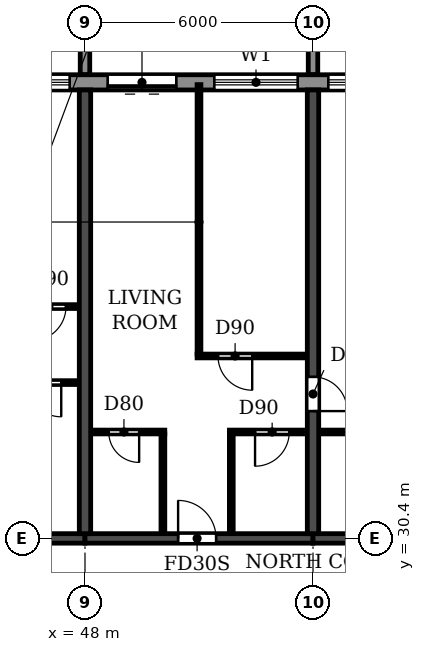
"""IFC4 building model, lengths in metres.
Left out: names, types, materials, properties, quantities, classifications, styles, units other than length and angle.
Written with IfcOpenShell. Run it as: python <this file> out.ifc"""

import sys

from ifc_helpers import new_model, si_unit, direction, frame, frame_2d, origin, place, context, subcontext, project, spatial, polyline, rectangle, outline, extrude, source, transform, mapped, element, fill, save


model = new_model("IFC4")
c1 = context("Model", 3, precision=1e-05, world=origin(), true_north=direction((0.0, 1.0)))
c2 = subcontext(c1, "Body", "Model", "MODEL_VIEW")
j1 = project(units=[si_unit("LENGTHUNIT", "METRE"), si_unit("PLANEANGLEUNIT", "RADIAN")], contexts=[c1])
p1 = place(None, origin())
s1 = spatial("IfcSite", under=j1, at=p1, CompositionType="ELEMENT")
p2 = place(p1, origin())
s2 = spatial("IfcBuilding", under=s1, at=p2, CompositionType="ELEMENT")
p3 = place(p2, frame((0.0, 0.0, 152.1)))
s3 = spatial("IfcBuildingStorey", under=s2, at=p3, CompositionType="ELEMENT", Elevation=152.1)
p4 = place(p3, frame((48.0, 30.525, 0.0), z_axis=(0.0, 0.0, 1.0), x_axis=(0.0, 1.0, 0.0)))
e1 = element("IfcWall", 1, at=p4, inside=s3, PredefinedType="SHEAR", context=c2, shape_type="SweptSolid", body=[
    extrude(rectangle(XDim=11.675, YDim=0.3, at=frame_2d((5.837, 0.0))), origin(), (0.0, 0.0, 1.0), 3.07),
])
p5 = place(p3, frame((54.0, 30.525, 0.0), z_axis=(0.0, 0.0, 1.0), x_axis=(0.0, 1.0, 0.0)))
e2 = element("IfcWall", 2, at=p5, inside=s3, PredefinedType="SHEAR", context=c2, shape_type="SweptSolid", body=[
    extrude(rectangle(XDim=11.675, YDim=0.3, at=frame_2d((5.837, 0.0))), origin(), (0.0, 0.0, 1.0), 3.07),
])
p6 = place(p5, frame((3.225, 0.0, 0.0)))
e3 = element("IfcOpeningElement", 3, at=p6, cuts=e2, PredefinedType="OPENING", context=c2, shape_type="SweptSolid", body=[
    extrude(rectangle(XDim=0.9, YDim=2.1, at=frame_2d((0.45, 1.05))), frame((0.0, 0.16, 0.0), z_axis=(0.0, -1.0, 0.0), x_axis=(1.0, 0.0, 0.0)), (0.0, 0.0, 1.0), 0.32),
])
p7 = place(p3, frame((42.0, 30.4, 0.0), z_axis=(0.0, 0.0, 1.0), x_axis=(1.0, 0.0, 0.0)))
e4 = element("IfcWall", 4, at=p7, inside=s3, PredefinedType="SHEAR", context=c2, shape_type="SweptSolid", body=[
    extrude(rectangle(XDim=6.0, YDim=0.25, at=frame_2d((3.0, 0.0))), origin(), (0.0, 0.0, 1.0), 2.47),
])
p8 = place(p7, frame((2.45, 0.0, 0.0)))
e5 = element("IfcOpeningElement", 5, at=p8, cuts=e4, PredefinedType="OPENING", context=c2, shape_type="SweptSolid", body=[
    extrude(rectangle(XDim=1.0, YDim=2.1, at=frame_2d((0.5, 1.05))), frame((0.0, 0.135, 0.0), z_axis=(0.0, -1.0, 0.0), x_axis=(1.0, 0.0, 0.0)), (0.0, 0.0, 1.0), 0.27),
])
p9 = place(p3, frame((48.0, 30.4, 0.0), z_axis=(0.0, 0.0, 1.0), x_axis=(1.0, 0.0, 0.0)))
e6 = element("IfcWall", 6, at=p9, inside=s3, PredefinedType="SHEAR", context=c2, shape_type="SweptSolid", body=[
    extrude(rectangle(XDim=6.0, YDim=0.25, at=frame_2d((3.0, 0.0))), origin(), (0.0, 0.0, 1.0), 2.47),
])
p10 = place(p9, frame((2.45, 0.0, 0.0)))
e7 = element("IfcOpeningElement", 7, at=p10, cuts=e6, PredefinedType="OPENING", context=c2, shape_type="SweptSolid", body=[
    extrude(rectangle(XDim=1.0, YDim=2.1, at=frame_2d((0.5, 1.05))), frame((0.0, 0.135, 0.0), z_axis=(0.0, -1.0, 0.0), x_axis=(1.0, 0.0, 0.0)), (0.0, 0.0, 1.0), 0.27),
])
p11 = place(p3, frame((54.0, 30.4, 0.0), z_axis=(0.0, 0.0, 1.0), x_axis=(1.0, 0.0, 0.0)))
e8 = element("IfcWall", 8, at=p11, inside=s3, PredefinedType="SHEAR", context=c2, shape_type="SweptSolid", body=[
    extrude(rectangle(XDim=6.0, YDim=0.25, at=frame_2d((3.0, 0.0))), origin(), (0.0, 0.0, 1.0), 2.47),
])
p12 = place(p3, frame((85.317, 42.4, 0.0), z_axis=(0.0, 0.0, 1.0), x_axis=(-1.0, 0.0, 0.0)))
e9 = element("IfcWall", 9, at=p12, inside=s3, PredefinedType="STANDARD", context=c2, shape_type="SweptSolid", body=[
    extrude(rectangle(XDim=68.634, YDim=0.4, at=frame_2d((34.317, 0.0))), origin(), (0.0, 0.0, 1.0), 3.07),
])
p13 = place(p12, frame((64.917, 0.0, 0.0)))
e10 = element("IfcOpeningElement", 10, at=p13, cuts=e9, PredefinedType="OPENING", context=c2, shape_type="SweptSolid", body=[
    extrude(rectangle(XDim=1.8, YDim=2.4, at=frame_2d((0.9, 1.2))), frame((0.0, 0.21, 0.0), z_axis=(0.0, -1.0, 0.0), x_axis=(1.0, 0.0, 0.0)), (0.0, 0.0, 1.0), 0.42),
])
p14 = place(p12, frame((61.717, 0.0, 0.9)))
e11 = element("IfcOpeningElement", 11, at=p14, cuts=e9, PredefinedType="OPENING", context=c2, shape_type="SweptSolid", body=[
    extrude(rectangle(XDim=2.2, YDim=1.5, at=frame_2d((1.1, 0.75))), frame((0.0, 0.21, 0.0), z_axis=(0.0, -1.0, 0.0), x_axis=(1.0, 0.0, 0.0)), (0.0, 0.0, 1.0), 0.42),
])
p15 = place(p12, frame((58.717, 0.0, 0.9)))
e12 = element("IfcOpeningElement", 12, at=p15, cuts=e9, PredefinedType="OPENING", context=c2, shape_type="SweptSolid", body=[
    extrude(rectangle(XDim=2.2, YDim=1.5, at=frame_2d((1.1, 0.75))), frame((0.0, 0.21, 0.0), z_axis=(0.0, -1.0, 0.0), x_axis=(1.0, 0.0, 0.0)), (0.0, 0.0, 1.0), 0.42),
])
p16 = place(p12, frame((55.917, 0.0, 0.0)))
e13 = element("IfcOpeningElement", 13, at=p16, cuts=e9, PredefinedType="OPENING", context=c2, shape_type="SweptSolid", body=[
    extrude(rectangle(XDim=1.8, YDim=2.4, at=frame_2d((0.9, 1.2))), frame((0.0, 0.21, 0.0), z_axis=(0.0, -1.0, 0.0), x_axis=(1.0, 0.0, 0.0)), (0.0, 0.0, 1.0), 0.42),
])
p17 = place(p12, frame((52.917, 0.0, 0.0)))
e14 = element("IfcOpeningElement", 14, at=p17, cuts=e9, PredefinedType="OPENING", context=c2, shape_type="SweptSolid", body=[
    extrude(rectangle(XDim=1.8, YDim=2.4, at=frame_2d((0.9, 1.2))), frame((0.0, 0.21, 0.0), z_axis=(0.0, -1.0, 0.0), x_axis=(1.0, 0.0, 0.0)), (0.0, 0.0, 1.0), 0.42),
])
p18 = place(p12, frame((49.717, 0.0, 0.9)))
e15 = element("IfcOpeningElement", 15, at=p18, cuts=e9, PredefinedType="OPENING", context=c2, shape_type="SweptSolid", body=[
    extrude(rectangle(XDim=2.2, YDim=1.5, at=frame_2d((1.1, 0.75))), frame((0.0, 0.21, 0.0), z_axis=(0.0, -1.0, 0.0), x_axis=(1.0, 0.0, 0.0)), (0.0, 0.0, 1.0), 0.42),
])
p19 = place(p12, frame((46.717, 0.0, 0.9)))
e16 = element("IfcOpeningElement", 16, at=p19, cuts=e9, PredefinedType="OPENING", context=c2, shape_type="SweptSolid", body=[
    extrude(rectangle(XDim=2.2, YDim=1.5, at=frame_2d((1.1, 0.75))), frame((0.0, 0.21, 0.0), z_axis=(0.0, -1.0, 0.0), x_axis=(1.0, 0.0, 0.0)), (0.0, 0.0, 1.0), 0.42),
])
p20 = place(p12, frame((43.717, 0.0, 0.9)))
e17 = element("IfcOpeningElement", 17, at=p20, cuts=e9, PredefinedType="OPENING", context=c2, shape_type="SweptSolid", body=[
    extrude(rectangle(XDim=2.2, YDim=1.5, at=frame_2d((1.1, 0.75))), frame((0.0, 0.21, 0.0), z_axis=(0.0, -1.0, 0.0), x_axis=(1.0, 0.0, 0.0)), (0.0, 0.0, 1.0), 0.42),
])
p21 = place(p12, frame((40.917, 0.0, 0.0)))
e18 = element("IfcOpeningElement", 18, at=p21, cuts=e9, PredefinedType="OPENING", context=c2, shape_type="SweptSolid", body=[
    extrude(rectangle(XDim=1.8, YDim=2.4, at=frame_2d((0.9, 1.2))), frame((0.0, 0.21, 0.0), z_axis=(0.0, -1.0, 0.0), x_axis=(1.0, 0.0, 0.0)), (0.0, 0.0, 1.0), 0.42),
])
p22 = place(p12, frame((37.717, 0.0, 0.9)))
e19 = element("IfcOpeningElement", 19, at=p22, cuts=e9, PredefinedType="OPENING", context=c2, shape_type="SweptSolid", body=[
    extrude(rectangle(XDim=2.2, YDim=1.5, at=frame_2d((1.1, 0.75))), frame((0.0, 0.21, 0.0), z_axis=(0.0, -1.0, 0.0), x_axis=(1.0, 0.0, 0.0)), (0.0, 0.0, 1.0), 0.42),
])
p23 = place(p12, frame((34.917, 0.0, 0.0)))
e20 = element("IfcOpeningElement", 20, at=p23, cuts=e9, PredefinedType="OPENING", context=c2, shape_type="SweptSolid", body=[
    extrude(rectangle(XDim=1.8, YDim=2.4, at=frame_2d((0.9, 1.2))), frame((0.0, 0.21, 0.0), z_axis=(0.0, -1.0, 0.0), x_axis=(1.0, 0.0, 0.0)), (0.0, 0.0, 1.0), 0.42),
])
p24 = place(p12, frame((31.717, 0.0, 0.9)))
e21 = element("IfcOpeningElement", 21, at=p24, cuts=e9, PredefinedType="OPENING", context=c2, shape_type="SweptSolid", body=[
    extrude(rectangle(XDim=2.2, YDim=1.5, at=frame_2d((1.1, 0.75))), frame((0.0, 0.21, 0.0), z_axis=(0.0, -1.0, 0.0), x_axis=(1.0, 0.0, 0.0)), (0.0, 0.0, 1.0), 0.42),
])
p25 = place(p12, frame((28.717, 0.0, 0.9)))
e22 = element("IfcOpeningElement", 22, at=p25, cuts=e9, PredefinedType="OPENING", context=c2, shape_type="SweptSolid", body=[
    extrude(rectangle(XDim=2.2, YDim=1.5, at=frame_2d((1.1, 0.75))), frame((0.0, 0.21, 0.0), z_axis=(0.0, -1.0, 0.0), x_axis=(1.0, 0.0, 0.0)), (0.0, 0.0, 1.0), 0.42),
])
p26 = place(p12, frame((25.717, 0.0, 0.9)))
e23 = element("IfcOpeningElement", 23, at=p26, cuts=e9, PredefinedType="OPENING", context=c2, shape_type="SweptSolid", body=[
    extrude(rectangle(XDim=2.2, YDim=1.5, at=frame_2d((1.1, 0.75))), frame((0.0, 0.21, 0.0), z_axis=(0.0, -1.0, 0.0), x_axis=(1.0, 0.0, 0.0)), (0.0, 0.0, 1.0), 0.42),
])
p27 = place(p12, frame((22.717, 0.0, 0.9)))
e24 = element("IfcOpeningElement", 24, at=p27, cuts=e9, PredefinedType="OPENING", context=c2, shape_type="SweptSolid", body=[
    extrude(rectangle(XDim=2.2, YDim=1.5, at=frame_2d((1.1, 0.75))), frame((0.0, 0.21, 0.0), z_axis=(0.0, -1.0, 0.0), x_axis=(1.0, 0.0, 0.0)), (0.0, 0.0, 1.0), 0.42),
])
p28 = place(p12, frame((19.917, 0.0, 0.0)))
e25 = element("IfcOpeningElement", 25, at=p28, cuts=e9, PredefinedType="OPENING", context=c2, shape_type="SweptSolid", body=[
    extrude(rectangle(XDim=1.8, YDim=2.4, at=frame_2d((0.9, 1.2))), frame((0.0, 0.21, 0.0), z_axis=(0.0, -1.0, 0.0), x_axis=(1.0, 0.0, 0.0)), (0.0, 0.0, 1.0), 0.42),
])
p29 = place(p12, frame((16.717, 0.0, 0.9)))
e26 = element("IfcOpeningElement", 26, at=p29, cuts=e9, PredefinedType="OPENING", context=c2, shape_type="SweptSolid", body=[
    extrude(rectangle(XDim=2.2, YDim=1.5, at=frame_2d((1.1, 0.75))), frame((0.0, 0.21, 0.0), z_axis=(0.0, -1.0, 0.0), x_axis=(1.0, 0.0, 0.0)), (0.0, 0.0, 1.0), 0.42),
])
p30 = place(p12, frame((13.717, 0.0, 0.9)))
e27 = element("IfcOpeningElement", 27, at=p30, cuts=e9, PredefinedType="OPENING", context=c2, shape_type="SweptSolid", body=[
    extrude(rectangle(XDim=2.2, YDim=1.5, at=frame_2d((1.1, 0.75))), frame((0.0, 0.21, 0.0), z_axis=(0.0, -1.0, 0.0), x_axis=(1.0, 0.0, 0.0)), (0.0, 0.0, 1.0), 0.42),
])
p31 = place(p12, frame((10.917, 0.0, 0.0)))
e28 = element("IfcOpeningElement", 28, at=p31, cuts=e9, PredefinedType="OPENING", context=c2, shape_type="SweptSolid", body=[
    extrude(rectangle(XDim=1.8, YDim=2.4, at=frame_2d((0.9, 1.2))), frame((0.0, 0.21, 0.0), z_axis=(0.0, -1.0, 0.0), x_axis=(1.0, 0.0, 0.0)), (0.0, 0.0, 1.0), 0.42),
])
p32 = place(p12, frame((7.717, 0.0, 0.9)))
e29 = element("IfcOpeningElement", 29, at=p32, cuts=e9, PredefinedType="OPENING", context=c2, shape_type="SweptSolid", body=[
    extrude(rectangle(XDim=2.2, YDim=1.5, at=frame_2d((1.1, 0.75))), frame((0.0, 0.21, 0.0), z_axis=(0.0, -1.0, 0.0), x_axis=(1.0, 0.0, 0.0)), (0.0, 0.0, 1.0), 0.42),
])
p33 = place(p12, frame((4.717, 0.0, 0.9)))
e30 = element("IfcOpeningElement", 30, at=p33, cuts=e9, PredefinedType="OPENING", context=c2, shape_type="SweptSolid", body=[
    extrude(rectangle(XDim=2.2, YDim=1.5, at=frame_2d((1.1, 0.75))), frame((0.0, 0.21, 0.0), z_axis=(0.0, -1.0, 0.0), x_axis=(1.0, 0.0, 0.0)), (0.0, 0.0, 1.0), 0.42),
])
p34 = place(p12, frame((1.917, 0.0, 0.0)))
e31 = element("IfcOpeningElement", 31, at=p34, cuts=e9, PredefinedType="OPENING", context=c2, shape_type="SweptSolid", body=[
    extrude(rectangle(XDim=1.8, YDim=2.4, at=frame_2d((0.9, 1.2))), frame((0.0, 0.21, 0.0), z_axis=(0.0, -1.0, 0.0), x_axis=(1.0, 0.0, 0.0)), (0.0, 0.0, 1.0), 0.42),
])
m1 = source(origin(), c2, "Body", "SweptSolid", [
    extrude(outline(polyline([(0.0, 0.0), (0.25, 0.0), (0.25, 3.1), (0.0, 3.1), (0.0, 0.0)])), origin(), (0.0, 0.0, 1.0), 3.1),
])
for number, where in (
    (32, (47.875, 42.6, 0.0)),
    (33, (53.875, 42.6, 0.0)),
):
    element("IfcWall", number, at=place(p3, frame(where)), inside=s3, PredefinedType="STANDARD", context=c2, shape_type="MappedRepresentation", body=[
        mapped(m1, transform((0.0, 0.0, 0.0))),
    ])
p35 = place(p3, frame((48.16, 33.2, 0.0), z_axis=(0.0, 0.0, 1.0), x_axis=(1.0, 0.0, 0.0)))
e34 = element("IfcWall", 34, at=p35, inside=s3, PredefinedType="PARTITIONING", context=c2, shape_type="SweptSolid", body=[
    extrude(rectangle(XDim=1.94, YDim=0.1, at=frame_2d((0.97, 0.0))), origin(), (0.0, 0.0, 1.0), 3.07),
])
p36 = place(p35, frame((0.465, 0.0, 0.0)))
e35 = element("IfcOpeningElement", 35, at=p36, cuts=e34, PredefinedType="OPENING", context=c2, shape_type="SweptSolid", body=[
    extrude(rectangle(XDim=0.8, YDim=2.1, at=frame_2d((0.4, 1.05))), frame((0.0, 0.06, 0.0), z_axis=(0.0, -1.0, 0.0), x_axis=(1.0, 0.0, 0.0)), (0.0, 0.0, 1.0), 0.12),
])
p37 = place(p3, frame((51.8, 33.2, 0.0), z_axis=(0.0, 0.0, 1.0), x_axis=(1.0, 0.0, 0.0)))
e36 = element("IfcWall", 36, at=p37, inside=s3, PredefinedType="PARTITIONING", context=c2, shape_type="SweptSolid", body=[
    extrude(rectangle(XDim=2.04, YDim=0.1, at=frame_2d((1.02, 0.0))), origin(), (0.0, 0.0, 1.0), 3.07),
])
p38 = place(p37, frame((0.675, 0.0, 0.0)))
e37 = element("IfcOpeningElement", 37, at=p38, cuts=e36, PredefinedType="OPENING", context=c2, shape_type="SweptSolid", body=[
    extrude(rectangle(XDim=0.9, YDim=2.1, at=frame_2d((0.45, 1.05))), frame((0.0, 0.06, 0.0), z_axis=(0.0, -1.0, 0.0), x_axis=(1.0, 0.0, 0.0)), (0.0, 0.0, 1.0), 0.12),
])
p39 = place(p3, frame((54.16, 33.2, 0.0), z_axis=(0.0, 0.0, 1.0), x_axis=(1.0, 0.0, 0.0)))
e38 = element("IfcWall", 38, at=p39, inside=s3, PredefinedType="PARTITIONING", context=c2, shape_type="SweptSolid", body=[
    extrude(rectangle(XDim=2.74, YDim=0.1, at=frame_2d((1.37, 0.0))), origin(), (0.0, 0.0, 1.0), 3.07),
])
p40 = place(p39, frame((0.94, 0.0, 0.0)))
e39 = element("IfcOpeningElement", 39, at=p40, cuts=e38, PredefinedType="OPENING", context=c2, shape_type="SweptSolid", body=[
    extrude(rectangle(XDim=0.8, YDim=2.1, at=frame_2d((0.4, 1.05))), frame((0.0, 0.06, 0.0), z_axis=(0.0, -1.0, 0.0), x_axis=(1.0, 0.0, 0.0)), (0.0, 0.0, 1.0), 0.12),
])
p41 = place(p3, frame((45.8, 34.5, 0.0), z_axis=(0.0, 0.0, 1.0), x_axis=(1.0, 0.0, 0.0)))
e40 = element("IfcWall", 40, at=p41, inside=s3, PredefinedType="PARTITIONING", context=c2, shape_type="SweptSolid", body=[
    extrude(rectangle(XDim=2.04, YDim=0.1, at=frame_2d((1.02, 0.0))), origin(), (0.0, 0.0, 1.0), 3.07),
])
p42 = place(p41, frame((0.675, 0.0, 0.0)))
e41 = element("IfcOpeningElement", 41, at=p42, cuts=e40, PredefinedType="OPENING", context=c2, shape_type="SweptSolid", body=[
    extrude(rectangle(XDim=0.9, YDim=2.1, at=frame_2d((0.45, 1.05))), frame((0.0, 0.06, 0.0), z_axis=(0.0, -1.0, 0.0), x_axis=(1.0, 0.0, 0.0)), (0.0, 0.0, 1.0), 0.12),
])
p43 = place(p3, frame((50.95, 35.2, 0.0), z_axis=(0.0, 0.0, 1.0), x_axis=(1.0, 0.0, 0.0)))
e42 = element("IfcWall", 42, at=p43, inside=s3, PredefinedType="PARTITIONING", context=c2, shape_type="SweptSolid", body=[
    extrude(rectangle(XDim=2.89, YDim=0.1, at=frame_2d((1.445, 0.0))), origin(), (0.0, 0.0, 1.0), 3.07),
])
p44 = place(p43, frame((0.55, 0.0, 0.0)))
e43 = element("IfcOpeningElement", 43, at=p44, cuts=e42, PredefinedType="OPENING", context=c2, shape_type="SweptSolid", body=[
    extrude(rectangle(XDim=0.9, YDim=2.1, at=frame_2d((0.45, 1.05))), frame((0.0, 0.06, 0.0), z_axis=(0.0, -1.0, 0.0), x_axis=(1.0, 0.0, 0.0)), (0.0, 0.0, 1.0), 0.12),
])
p45 = place(p3, frame((44.95, 36.5, 0.0), z_axis=(0.0, 0.0, 1.0), x_axis=(1.0, 0.0, 0.0)))
e44 = element("IfcWall", 44, at=p45, inside=s3, PredefinedType="PARTITIONING", context=c2, shape_type="SweptSolid", body=[
    extrude(rectangle(XDim=2.89, YDim=0.1, at=frame_2d((1.445, 0.0))), origin(), (0.0, 0.0, 1.0), 3.07),
])
p46 = place(p45, frame((1.65, 0.0, 0.0)))
e45 = element("IfcOpeningElement", 45, at=p46, cuts=e44, PredefinedType="OPENING", context=c2, shape_type="SweptSolid", body=[
    extrude(rectangle(XDim=0.9, YDim=2.1, at=frame_2d((0.45, 1.05))), frame((0.0, 0.06, 0.0), z_axis=(0.0, -1.0, 0.0), x_axis=(1.0, 0.0, 0.0)), (0.0, 0.0, 1.0), 0.12),
])
p47 = place(p3, frame((50.05, 30.535, 0.0), z_axis=(0.0, 0.0, 1.0), x_axis=(0.0, 1.0, 0.0)))
e46 = element("IfcWall", 46, at=p47, inside=s3, PredefinedType="PARTITIONING", context=c2, shape_type="SweptSolid", body=[
    extrude(rectangle(XDim=2.615, YDim=0.1, at=frame_2d((1.308, 0.0))), origin(), (0.0, 0.0, 1.0), 3.07),
])
p48 = place(p3, frame((51.0, 35.25, 0.0), z_axis=(0.0, 0.0, 1.0), x_axis=(0.0, 1.0, 0.0)))
e47 = element("IfcWall", 47, at=p48, inside=s3, PredefinedType="PARTITIONING", context=c2, shape_type="SweptSolid", body=[
    extrude(rectangle(XDim=7.09, YDim=0.1, at=frame_2d((3.545, 0.0))), origin(), (0.0, 0.0, 1.0), 3.07),
])
p49 = place(p3, frame((51.85, 30.535, 0.0), z_axis=(0.0, 0.0, 1.0), x_axis=(0.0, 1.0, 0.0)))
e48 = element("IfcWall", 48, at=p49, inside=s3, PredefinedType="PARTITIONING", context=c2, shape_type="SweptSolid", body=[
    extrude(rectangle(XDim=2.615, YDim=0.1, at=frame_2d((1.308, 0.0))), origin(), (0.0, 0.0, 1.0), 3.07),
])
p50 = place(p22, origin())
e49 = element("IfcWindow", 49, at=p50, inside=s3, PartitioningType="DOUBLE_PANEL_HORIZONTAL", PredefinedType="WINDOW", context=c2, shape_type="SweptSolid", body=[
    extrude(rectangle(XDim=2.2, YDim=1.5, at=frame_2d((1.1, 0.75))), frame((0.0, 0.03, 0.0), z_axis=(0.0, -1.0, 0.0), x_axis=(1.0, 0.0, 0.0)), (0.0, 0.0, 1.0), 0.06),
])
fill(e19, e49)
p51 = place(p23, origin())
e50 = element("IfcDoor", 50, at=p51, inside=s3, OperationType="DOUBLE_DOOR_SLIDING", PredefinedType="DOOR", context=c2, shape_type="SweptSolid", body=[
    extrude(rectangle(XDim=1.8, YDim=2.4, at=frame_2d((0.9, 1.2))), frame((0.0, 0.025, 0.0), z_axis=(0.0, -1.0, 0.0), x_axis=(1.0, 0.0, 0.0)), (0.0, 0.0, 1.0), 0.05),
])
fill(e20, e50)
p52 = place(p24, origin())
e51 = element("IfcWindow", 51, at=p52, inside=s3, PartitioningType="DOUBLE_PANEL_HORIZONTAL", PredefinedType="WINDOW", context=c2, shape_type="SweptSolid", body=[
    extrude(rectangle(XDim=2.2, YDim=1.5, at=frame_2d((1.1, 0.75))), frame((0.0, 0.03, 0.0), z_axis=(0.0, -1.0, 0.0), x_axis=(1.0, 0.0, 0.0)), (0.0, 0.0, 1.0), 0.06),
])
fill(e21, e51)
p53 = place(p25, origin())
e52 = element("IfcWindow", 52, at=p53, inside=s3, PartitioningType="DOUBLE_PANEL_HORIZONTAL", PredefinedType="WINDOW", context=c2, shape_type="SweptSolid", body=[
    extrude(rectangle(XDim=2.2, YDim=1.5, at=frame_2d((1.1, 0.75))), frame((0.0, 0.03, 0.0), z_axis=(0.0, -1.0, 0.0), x_axis=(1.0, 0.0, 0.0)), (0.0, 0.0, 1.0), 0.06),
])
fill(e22, e52)
p54 = place(p42, frame((0.9, 0.0, 0.0), z_axis=(0.0, 0.0, 1.0), x_axis=(-1.0, 0.0, 0.0)))
e53 = element("IfcDoor", 53, at=p54, inside=s3, OperationType="SINGLE_SWING_LEFT", PredefinedType="DOOR", context=c2, shape_type="SweptSolid", body=[
    extrude(rectangle(XDim=0.9, YDim=2.1, at=frame_2d((0.45, 1.05))), frame((0.0, 0.025, 0.0), z_axis=(0.0, -1.0, 0.0), x_axis=(1.0, 0.0, 0.0)), (0.0, 0.0, 1.0), 0.05),
])
fill(e41, e53)
p55 = place(p46, frame((0.9, 0.0, 0.0), z_axis=(0.0, 0.0, 1.0), x_axis=(-1.0, 0.0, 0.0)))
e54 = element("IfcDoor", 54, at=p55, inside=s3, OperationType="SINGLE_SWING_RIGHT", PredefinedType="DOOR", context=c2, shape_type="SweptSolid", body=[
    extrude(rectangle(XDim=0.9, YDim=2.1, at=frame_2d((0.45, 1.05))), frame((0.0, 0.025, 0.0), z_axis=(0.0, -1.0, 0.0), x_axis=(1.0, 0.0, 0.0)), (0.0, 0.0, 1.0), 0.05),
])
fill(e45, e54)
p56 = place(p36, frame((0.8, 0.0, 0.0), z_axis=(0.0, 0.0, 1.0), x_axis=(-1.0, 0.0, 0.0)))
e55 = element("IfcDoor", 55, at=p56, inside=s3, OperationType="SINGLE_SWING_LEFT", PredefinedType="DOOR", context=c2, shape_type="SweptSolid", body=[
    extrude(rectangle(XDim=0.8, YDim=2.1, at=frame_2d((0.4, 1.05))), frame((0.0, 0.025, 0.0), z_axis=(0.0, -1.0, 0.0), x_axis=(1.0, 0.0, 0.0)), (0.0, 0.0, 1.0), 0.05),
])
fill(e35, e55)
p57 = place(p10, origin())
e56 = element("IfcDoor", 56, at=p57, inside=s3, OperationType="SINGLE_SWING_LEFT", PredefinedType="DOOR", context=c2, shape_type="SweptSolid", body=[
    extrude(rectangle(XDim=1.0, YDim=2.1, at=frame_2d((0.5, 1.05))), frame((0.0, 0.025, 0.0), z_axis=(0.0, -1.0, 0.0), x_axis=(1.0, 0.0, 0.0)), (0.0, 0.0, 1.0), 0.05),
])
fill(e7, e56)
p58 = place(p44, frame((0.9, 0.0, 0.0), z_axis=(0.0, 0.0, 1.0), x_axis=(-1.0, 0.0, 0.0)))
e57 = element("IfcDoor", 57, at=p58, inside=s3, OperationType="SINGLE_SWING_LEFT", PredefinedType="DOOR", context=c2, shape_type="SweptSolid", body=[
    extrude(rectangle(XDim=0.9, YDim=2.1, at=frame_2d((0.45, 1.05))), frame((0.0, 0.025, 0.0), z_axis=(0.0, -1.0, 0.0), x_axis=(1.0, 0.0, 0.0)), (0.0, 0.0, 1.0), 0.05),
])
fill(e43, e57)
p59 = place(p38, frame((0.9, 0.0, 0.0), z_axis=(0.0, 0.0, 1.0), x_axis=(-1.0, 0.0, 0.0)))
e58 = element("IfcDoor", 58, at=p59, inside=s3, OperationType="SINGLE_SWING_RIGHT", PredefinedType="DOOR", context=c2, shape_type="SweptSolid", body=[
    extrude(rectangle(XDim=0.9, YDim=2.1, at=frame_2d((0.45, 1.05))), frame((0.0, 0.025, 0.0), z_axis=(0.0, -1.0, 0.0), x_axis=(1.0, 0.0, 0.0)), (0.0, 0.0, 1.0), 0.05),
])
fill(e37, e58)
p60 = place(p6, frame((0.9, 0.0, 0.0), z_axis=(0.0, 0.0, 1.0), x_axis=(-1.0, 0.0, 0.0)))
e59 = element("IfcDoor", 59, at=p60, inside=s3, OperationType="SINGLE_SWING_RIGHT", PredefinedType="DOOR", context=c2, shape_type="SweptSolid", body=[
    extrude(rectangle(XDim=0.9, YDim=2.1, at=frame_2d((0.45, 1.05))), frame((0.0, 0.025, 0.0), z_axis=(0.0, -1.0, 0.0), x_axis=(1.0, 0.0, 0.0)), (0.0, 0.0, 1.0), 0.05),
])
fill(e3, e59)
save(model, sys.argv[1])
